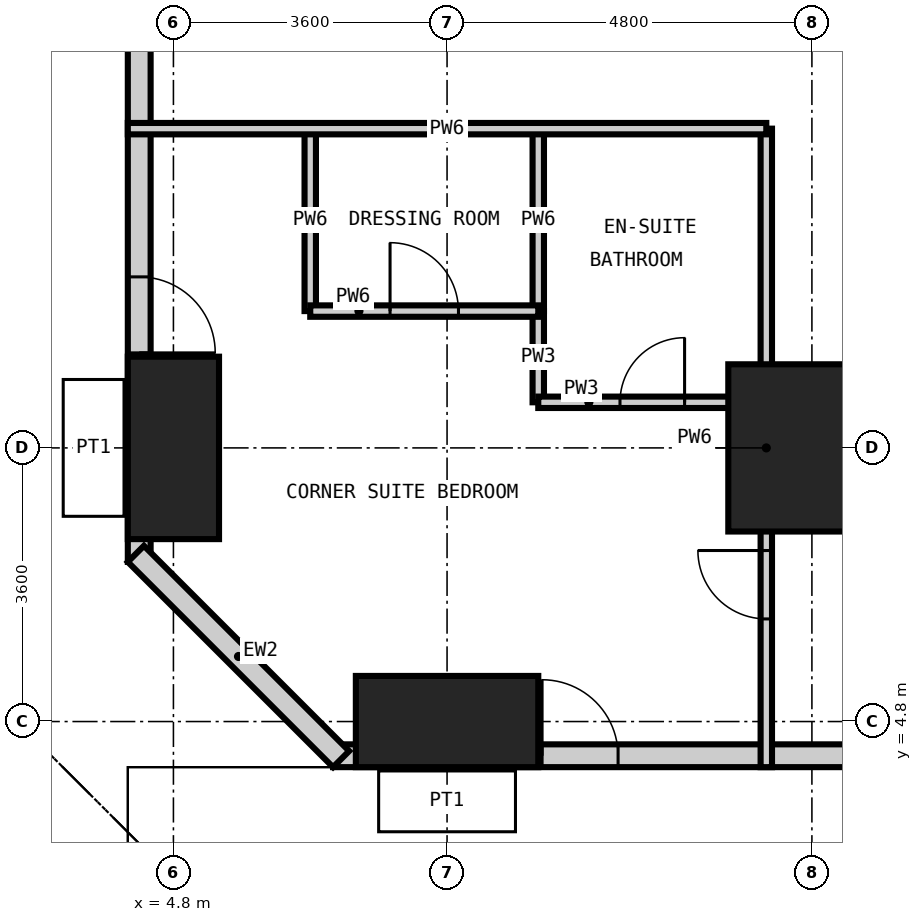
"""IFC4 building model, lengths in metres.
Left out: names, types, materials, properties, quantities, classifications, styles, units other than length and angle.
Written with IfcOpenShell. Run it as: python <this file> out.ifc"""

import sys

from ifc_helpers import new_model, si_unit, direction, frame, frame_2d, origin, origin_2d, place, context, subcontext, project, spatial, rectangle, extrude, element, fill, save


model = new_model("IFC4")
c1 = context("Model", 3, precision=1e-05, world=origin(), true_north=direction((0.0, 1.0)))
c2 = subcontext(c1, "Body", "Model", "MODEL_VIEW")
j1 = project(units=[si_unit("LENGTHUNIT", "METRE"), si_unit("PLANEANGLEUNIT", "RADIAN")], contexts=[c1])
p1 = place(None, origin())
s1 = spatial("IfcSite", under=j1, at=p1, CompositionType="ELEMENT")
p2 = place(p1, origin())
s2 = spatial("IfcBuilding", under=s1, at=p2, CompositionType="ELEMENT")
p3 = place(p2, frame((0.0, 0.0, 159.0)))
s3 = spatial("IfcBuildingStorey", under=s2, at=p3, CompositionType="ELEMENT", Elevation=159.0)
p4 = place(p3, frame((4.8, 8.4, -0.35), z_axis=(0.0, 0.0, 1.0), x_axis=(1.0, 0.0, 0.0)))
e1 = element("IfcColumn", 1, at=p4, inside=s3, PredefinedType="COLUMN", context=c2, shape_type="SweptSolid", body=[
    extrude(rectangle(XDim=1.2, YDim=2.4, at=origin_2d()), origin(), (0.0, 0.0, 1.0), 3.6),
])
p5 = place(p3, frame((8.4, 4.8, -0.35), z_axis=(0.0, 0.0, 1.0), x_axis=(1.0, 0.0, 0.0)))
e2 = element("IfcColumn", 2, at=p5, inside=s3, PredefinedType="COLUMN", context=c2, shape_type="SweptSolid", body=[
    extrude(rectangle(XDim=2.4, YDim=1.2, at=origin_2d()), origin(), (0.0, 0.0, 1.0), 3.6),
])
p6 = place(p3, frame((13.2, 8.4, -0.35), z_axis=(0.0, 0.0, 1.0), x_axis=(1.0, 0.0, 0.0)))
e3 = element("IfcColumn", 3, at=p6, inside=s3, PredefinedType="COLUMN", context=c2, shape_type="SweptSolid", body=[
    extrude(rectangle(XDim=2.2, YDim=2.2, at=origin_2d()), origin(), (0.0, 0.0, 1.0), 3.6),
])
p7 = place(p3, frame((6.9, 4.35, 0.0), z_axis=(0.0, 0.0, 1.0), x_axis=(1.0, 0.0, 0.0)))
e4 = element("IfcWall", 4, at=p7, inside=s3, PredefinedType="SOLIDWALL", context=c2, shape_type="SweptSolid", body=[
    extrude(rectangle(XDim=45.0, YDim=0.3, at=frame_2d((22.5, 0.0))), origin(), (0.0, 0.0, 1.0), 3.25),
])
p8 = place(p7, frame((2.75, 0.0, 0.0)))
e5 = element("IfcOpeningElement", 5, at=p8, cuts=e4, PredefinedType="OPENING", context=c2, shape_type="SweptSolid", body=[
    extrude(rectangle(XDim=1.0, YDim=2.4, at=frame_2d((0.5, 1.2))), frame((0.0, 0.16, 0.0), z_axis=(0.0, -1.0, 0.0), x_axis=(1.0, 0.0, 0.0)), (0.0, 0.0, 1.0), 0.32),
])
p9 = place(p7, frame((7.3, 0.0, 0.0)))
e6 = element("IfcOpeningElement", 6, at=p9, cuts=e4, PredefinedType="OPENING", context=c2, shape_type="SweptSolid", body=[
    extrude(rectangle(XDim=1.0, YDim=2.4, at=frame_2d((0.5, 1.2))), frame((0.0, 0.16, 0.0), z_axis=(0.0, -1.0, 0.0), x_axis=(1.0, 0.0, 0.0)), (0.0, 0.0, 1.0), 0.32),
])
p10 = place(p7, frame((11.5, 0.0, 0.0)))
e7 = element("IfcOpeningElement", 7, at=p10, cuts=e4, PredefinedType="OPENING", context=c2, shape_type="SweptSolid", body=[
    extrude(rectangle(XDim=1.0, YDim=2.4, at=frame_2d((0.5, 1.2))), frame((0.0, 0.16, 0.0), z_axis=(0.0, -1.0, 0.0), x_axis=(1.0, 0.0, 0.0)), (0.0, 0.0, 1.0), 0.32),
])
p11 = place(p7, frame((15.7, 0.0, 0.0)))
e8 = element("IfcOpeningElement", 8, at=p11, cuts=e4, PredefinedType="OPENING", context=c2, shape_type="SweptSolid", body=[
    extrude(rectangle(XDim=1.0, YDim=2.4, at=frame_2d((0.5, 1.2))), frame((0.0, 0.16, 0.0), z_axis=(0.0, -1.0, 0.0), x_axis=(1.0, 0.0, 0.0)), (0.0, 0.0, 1.0), 0.32),
])
p12 = place(p7, frame((19.9, 0.0, 0.0)))
e9 = element("IfcOpeningElement", 9, at=p12, cuts=e4, PredefinedType="OPENING", context=c2, shape_type="SweptSolid", body=[
    extrude(rectangle(XDim=1.0, YDim=2.4, at=frame_2d((0.5, 1.2))), frame((0.0, 0.16, 0.0), z_axis=(0.0, -1.0, 0.0), x_axis=(1.0, 0.0, 0.0)), (0.0, 0.0, 1.0), 0.32),
])
p13 = place(p7, frame((24.1, 0.0, 0.0)))
e10 = element("IfcOpeningElement", 10, at=p13, cuts=e4, PredefinedType="OPENING", context=c2, shape_type="SweptSolid", body=[
    extrude(rectangle(XDim=1.0, YDim=2.4, at=frame_2d((0.5, 1.2))), frame((0.0, 0.16, 0.0), z_axis=(0.0, -1.0, 0.0), x_axis=(1.0, 0.0, 0.0)), (0.0, 0.0, 1.0), 0.32),
])
p14 = place(p7, frame((28.3, 0.0, 0.0)))
e11 = element("IfcOpeningElement", 11, at=p14, cuts=e4, PredefinedType="OPENING", context=c2, shape_type="SweptSolid", body=[
    extrude(rectangle(XDim=1.0, YDim=2.4, at=frame_2d((0.5, 1.2))), frame((0.0, 0.16, 0.0), z_axis=(0.0, -1.0, 0.0), x_axis=(1.0, 0.0, 0.0)), (0.0, 0.0, 1.0), 0.32),
])
p15 = place(p7, frame((32.5, 0.0, 0.0)))
e12 = element("IfcOpeningElement", 12, at=p15, cuts=e4, PredefinedType="OPENING", context=c2, shape_type="SweptSolid", body=[
    extrude(rectangle(XDim=1.0, YDim=2.4, at=frame_2d((0.5, 1.2))), frame((0.0, 0.16, 0.0), z_axis=(0.0, -1.0, 0.0), x_axis=(1.0, 0.0, 0.0)), (0.0, 0.0, 1.0), 0.32),
])
p16 = place(p7, frame((36.7, 0.0, 0.0)))
e13 = element("IfcOpeningElement", 13, at=p16, cuts=e4, PredefinedType="OPENING", context=c2, shape_type="SweptSolid", body=[
    extrude(rectangle(XDim=1.0, YDim=2.4, at=frame_2d((0.5, 1.2))), frame((0.0, 0.16, 0.0), z_axis=(0.0, -1.0, 0.0), x_axis=(1.0, 0.0, 0.0)), (0.0, 0.0, 1.0), 0.32),
])
p17 = place(p7, frame((41.25, 0.0, 0.0)))
e14 = element("IfcOpeningElement", 14, at=p17, cuts=e4, PredefinedType="OPENING", context=c2, shape_type="SweptSolid", body=[
    extrude(rectangle(XDim=1.0, YDim=2.4, at=frame_2d((0.5, 1.2))), frame((0.0, 0.16, 0.0), z_axis=(0.0, -1.0, 0.0), x_axis=(1.0, 0.0, 0.0)), (0.0, 0.0, 1.0), 0.32),
])
p18 = place(p3, frame((4.35, 51.9, 0.0), z_axis=(0.0, 0.0, 1.0), x_axis=(0.0, -1.0, 0.0)))
e15 = element("IfcWall", 15, at=p18, inside=s3, PredefinedType="SOLIDWALL", context=c2, shape_type="SweptSolid", body=[
    extrude(rectangle(XDim=45.0, YDim=0.3, at=frame_2d((22.5, 0.0))), origin(), (0.0, 0.0, 1.0), 3.25),
])
p19 = place(p18, frame((41.25, 0.0, 0.0)))
e16 = element("IfcOpeningElement", 16, at=p19, cuts=e15, PredefinedType="OPENING", context=c2, shape_type="SweptSolid", body=[
    extrude(rectangle(XDim=1.0, YDim=2.4, at=frame_2d((0.5, 1.2))), frame((0.0, 0.16, 0.0), z_axis=(0.0, -1.0, 0.0), x_axis=(1.0, 0.0, 0.0)), (0.0, 0.0, 1.0), 0.32),
])
p20 = place(p18, frame((36.7, 0.0, 0.0)))
e17 = element("IfcOpeningElement", 17, at=p20, cuts=e15, PredefinedType="OPENING", context=c2, shape_type="SweptSolid", body=[
    extrude(rectangle(XDim=1.0, YDim=2.4, at=frame_2d((0.5, 1.2))), frame((0.0, 0.16, 0.0), z_axis=(0.0, -1.0, 0.0), x_axis=(1.0, 0.0, 0.0)), (0.0, 0.0, 1.0), 0.32),
])
p21 = place(p18, frame((32.5, 0.0, 0.0)))
e18 = element("IfcOpeningElement", 18, at=p21, cuts=e15, PredefinedType="OPENING", context=c2, shape_type="SweptSolid", body=[
    extrude(rectangle(XDim=1.0, YDim=2.4, at=frame_2d((0.5, 1.2))), frame((0.0, 0.16, 0.0), z_axis=(0.0, -1.0, 0.0), x_axis=(1.0, 0.0, 0.0)), (0.0, 0.0, 1.0), 0.32),
])
p22 = place(p18, frame((28.3, 0.0, 0.0)))
e19 = element("IfcOpeningElement", 19, at=p22, cuts=e15, PredefinedType="OPENING", context=c2, shape_type="SweptSolid", body=[
    extrude(rectangle(XDim=1.0, YDim=2.4, at=frame_2d((0.5, 1.2))), frame((0.0, 0.16, 0.0), z_axis=(0.0, -1.0, 0.0), x_axis=(1.0, 0.0, 0.0)), (0.0, 0.0, 1.0), 0.32),
])
p23 = place(p18, frame((24.1, 0.0, 0.0)))
e20 = element("IfcOpeningElement", 20, at=p23, cuts=e15, PredefinedType="OPENING", context=c2, shape_type="SweptSolid", body=[
    extrude(rectangle(XDim=1.0, YDim=2.4, at=frame_2d((0.5, 1.2))), frame((0.0, 0.16, 0.0), z_axis=(0.0, -1.0, 0.0), x_axis=(1.0, 0.0, 0.0)), (0.0, 0.0, 1.0), 0.32),
])
p24 = place(p18, frame((19.9, 0.0, 0.0)))
e21 = element("IfcOpeningElement", 21, at=p24, cuts=e15, PredefinedType="OPENING", context=c2, shape_type="SweptSolid", body=[
    extrude(rectangle(XDim=1.0, YDim=2.4, at=frame_2d((0.5, 1.2))), frame((0.0, 0.16, 0.0), z_axis=(0.0, -1.0, 0.0), x_axis=(1.0, 0.0, 0.0)), (0.0, 0.0, 1.0), 0.32),
])
p25 = place(p18, frame((15.7, 0.0, 0.0)))
e22 = element("IfcOpeningElement", 22, at=p25, cuts=e15, PredefinedType="OPENING", context=c2, shape_type="SweptSolid", body=[
    extrude(rectangle(XDim=1.0, YDim=2.4, at=frame_2d((0.5, 1.2))), frame((0.0, 0.16, 0.0), z_axis=(0.0, -1.0, 0.0), x_axis=(1.0, 0.0, 0.0)), (0.0, 0.0, 1.0), 0.32),
])
p26 = place(p18, frame((11.5, 0.0, 0.0)))
e23 = element("IfcOpeningElement", 23, at=p26, cuts=e15, PredefinedType="OPENING", context=c2, shape_type="SweptSolid", body=[
    extrude(rectangle(XDim=1.0, YDim=2.4, at=frame_2d((0.5, 1.2))), frame((0.0, 0.16, 0.0), z_axis=(0.0, -1.0, 0.0), x_axis=(1.0, 0.0, 0.0)), (0.0, 0.0, 1.0), 0.32),
])
p27 = place(p18, frame((7.3, 0.0, 0.0)))
e24 = element("IfcOpeningElement", 24, at=p27, cuts=e15, PredefinedType="OPENING", context=c2, shape_type="SweptSolid", body=[
    extrude(rectangle(XDim=1.0, YDim=2.4, at=frame_2d((0.5, 1.2))), frame((0.0, 0.16, 0.0), z_axis=(0.0, -1.0, 0.0), x_axis=(1.0, 0.0, 0.0)), (0.0, 0.0, 1.0), 0.32),
])
p28 = place(p18, frame((2.75, 0.0, 0.0)))
e25 = element("IfcOpeningElement", 25, at=p28, cuts=e15, PredefinedType="OPENING", context=c2, shape_type="SweptSolid", body=[
    extrude(rectangle(XDim=1.0, YDim=2.4, at=frame_2d((0.5, 1.2))), frame((0.0, 0.16, 0.0), z_axis=(0.0, -1.0, 0.0), x_axis=(1.0, 0.0, 0.0)), (0.0, 0.0, 1.0), 0.32),
])
p29 = place(p3, frame((4.306, 7.006, 0.0), z_axis=(0.0, 0.0, 1.0), x_axis=(0.707106781187, -0.707106781187, 0.0)))
e26 = element("IfcWall", 26, at=p29, inside=s3, PredefinedType="SOLIDWALL", context=c2, shape_type="SweptSolid", body=[
    extrude(rectangle(XDim=3.819, YDim=0.3, at=frame_2d((1.909, 0.0))), origin(), (0.0, 0.0, 1.0), 3.25),
])
p30 = place(p3, frame((9.6, 9.0, 0.0), z_axis=(0.0, 0.0, 1.0), x_axis=(0.0, 1.0, 0.0)))
e27 = element("IfcWall", 27, at=p30, inside=s3, PredefinedType="PARTITIONING", context=c2, shape_type="SweptSolid", body=[
    extrude(rectangle(XDim=1.2, YDim=0.15, at=frame_2d((0.6, 0.0))), origin(), (0.0, 0.0, 1.0), 3.25),
])
p31 = place(p3, frame((9.6, 9.0, 0.0), z_axis=(0.0, 0.0, 1.0), x_axis=(1.0, 0.0, 0.0)))
e28 = element("IfcWall", 28, at=p31, inside=s3, PredefinedType="PARTITIONING", context=c2, shape_type="SweptSolid", body=[
    extrude(rectangle(XDim=3.0, YDim=0.15, at=frame_2d((1.5, 0.0))), origin(), (0.0, 0.0, 1.0), 3.25),
])
p32 = place(p31, frame((1.075, 0.0, 0.0)))
e29 = element("IfcOpeningElement", 29, at=p32, cuts=e28, PredefinedType="OPENING", context=c2, shape_type="SweptSolid", body=[
    extrude(rectangle(XDim=0.85, YDim=2.1, at=frame_2d((0.425, 1.05))), frame((0.0, 0.085, 0.0), z_axis=(0.0, -1.0, 0.0), x_axis=(1.0, 0.0, 0.0)), (0.0, 0.0, 1.0), 0.17),
])
for number, where, z_axis, x_axis in (
    (30, (6.6, 10.2, 0.0), (0.0, 0.0, 1.0), (0.0, 1.0, 0.0)),
    (31, (9.6, 10.2, 0.0), (0.0, 0.0, 1.0), (0.0, 1.0, 0.0)),
):
    element("IfcWall", number, at=place(p3, frame(where, z_axis=z_axis, x_axis=x_axis)), inside=s3, PredefinedType="PARTITIONING", context=c2, shape_type="SweptSolid", body=[
        extrude(rectangle(XDim=2.4, YDim=0.15, at=frame_2d((1.2, 0.0))), origin(), (0.0, 0.0, 1.0), 3.25),
    ])
p33 = place(p3, frame((12.6, 4.2, 0.0), z_axis=(0.0, 0.0, 1.0), x_axis=(0.0, 1.0, 0.0)))
e32 = element("IfcWall", 32, at=p33, inside=s3, PredefinedType="PARTITIONING", context=c2, shape_type="SweptSolid", body=[
    extrude(rectangle(XDim=8.4, YDim=0.15, at=frame_2d((4.2, 0.0))), origin(), (0.0, 0.0, 1.0), 3.25),
])
p34 = place(p33, frame((1.95, 0.0, 0.0)))
e33 = element("IfcOpeningElement", 33, at=p34, cuts=e32, PredefinedType="OPENING", context=c2, shape_type="SweptSolid", body=[
    extrude(rectangle(XDim=0.9, YDim=2.1, at=frame_2d((0.45, 1.05))), frame((0.0, 0.085, 0.0), z_axis=(0.0, -1.0, 0.0), x_axis=(1.0, 0.0, 0.0)), (0.0, 0.0, 1.0), 0.17),
])
p35 = place(p3, frame((6.6, 10.2, 0.0), z_axis=(0.0, 0.0, 1.0), x_axis=(1.0, 0.0, 0.0)))
e34 = element("IfcWall", 34, at=p35, inside=s3, PredefinedType="PARTITIONING", context=c2, shape_type="SweptSolid", body=[
    extrude(rectangle(XDim=3.0, YDim=0.15, at=frame_2d((1.5, 0.0))), origin(), (0.0, 0.0, 1.0), 3.25),
])
p36 = place(p35, frame((1.05, 0.0, 0.0)))
e35 = element("IfcOpeningElement", 35, at=p36, cuts=e34, PredefinedType="OPENING", context=c2, shape_type="SweptSolid", body=[
    extrude(rectangle(XDim=0.9, YDim=2.1, at=frame_2d((0.45, 1.05))), frame((0.0, 0.085, 0.0), z_axis=(0.0, -1.0, 0.0), x_axis=(1.0, 0.0, 0.0)), (0.0, 0.0, 1.0), 0.17),
])
p37 = place(p3, frame((4.2, 12.6, 0.0), z_axis=(0.0, 0.0, 1.0), x_axis=(1.0, 0.0, 0.0)))
e36 = element("IfcWall", 36, at=p37, inside=s3, PredefinedType="PARTITIONING", context=c2, shape_type="SweptSolid", body=[
    extrude(rectangle(XDim=8.4, YDim=0.15, at=frame_2d((4.2, 0.0))), origin(), (0.0, 0.0, 1.0), 3.25),
])
p38 = place(p8, origin())
e37 = element("IfcDoor", 37, at=p38, inside=s3, OperationType="SINGLE_SWING_LEFT", PredefinedType="DOOR", context=c2, shape_type="SweptSolid", body=[
    extrude(rectangle(XDim=1.0, YDim=2.4, at=frame_2d((0.5, 1.2))), frame((0.0, 0.025, 0.0), z_axis=(0.0, -1.0, 0.0), x_axis=(1.0, 0.0, 0.0)), (0.0, 0.0, 1.0), 0.05),
])
fill(e5, e37)
p39 = place(p19, origin())
e38 = element("IfcDoor", 38, at=p39, inside=s3, OperationType="SINGLE_SWING_RIGHT", PredefinedType="DOOR", context=c2, shape_type="SweptSolid", body=[
    extrude(rectangle(XDim=1.0, YDim=2.4, at=frame_2d((0.5, 1.2))), frame((0.0, 0.025, 0.0), z_axis=(0.0, -1.0, 0.0), x_axis=(1.0, 0.0, 0.0)), (0.0, 0.0, 1.0), 0.05),
])
fill(e16, e38)
p40 = place(p34, origin())
e39 = element("IfcDoor", 39, at=p40, inside=s3, OperationType="SINGLE_SWING_RIGHT", PredefinedType="DOOR", context=c2, shape_type="SweptSolid", body=[
    extrude(rectangle(XDim=0.9, YDim=2.1, at=frame_2d((0.45, 1.05))), frame((0.0, 0.025, 0.0), z_axis=(0.0, -1.0, 0.0), x_axis=(1.0, 0.0, 0.0)), (0.0, 0.0, 1.0), 0.05),
])
fill(e33, e39)
p41 = place(p32, origin())
e40 = element("IfcDoor", 40, at=p41, inside=s3, OperationType="SINGLE_SWING_RIGHT", PredefinedType="DOOR", context=c2, shape_type="SweptSolid", body=[
    extrude(rectangle(XDim=0.85, YDim=2.1, at=frame_2d((0.425, 1.05))), frame((0.0, 0.025, 0.0), z_axis=(0.0, -1.0, 0.0), x_axis=(1.0, 0.0, 0.0)), (0.0, 0.0, 1.0), 0.05),
])
fill(e29, e40)
p42 = place(p36, origin())
e41 = element("IfcDoor", 41, at=p42, inside=s3, OperationType="SINGLE_SWING_LEFT", PredefinedType="DOOR", context=c2, shape_type="SweptSolid", body=[
    extrude(rectangle(XDim=0.9, YDim=2.1, at=frame_2d((0.45, 1.05))), frame((0.0, 0.025, 0.0), z_axis=(0.0, -1.0, 0.0), x_axis=(1.0, 0.0, 0.0)), (0.0, 0.0, 1.0), 0.05),
])
fill(e35, e41)
save(model, sys.argv[1])
